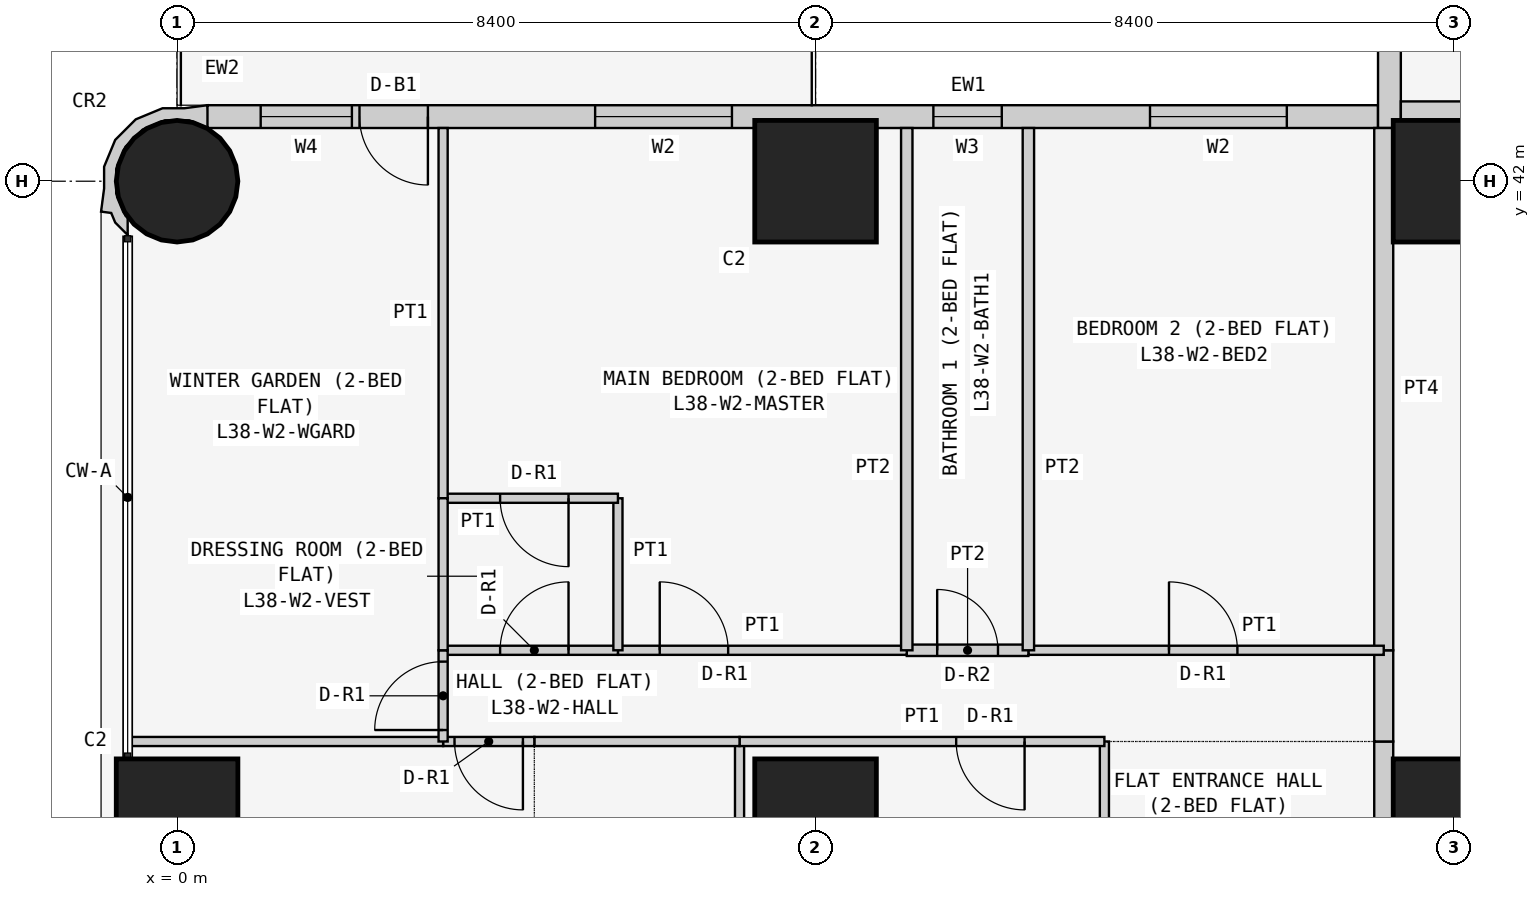
"""IFC4 building model, lengths in metres.
Left out: names, types, materials, properties, quantities, classifications, styles, units other than length and angle.
Written with IfcOpenShell. Run it as: python <this file> out.ifc"""

import sys

from ifc_helpers import new_model, si_unit, direction, frame, frame_2d, origin, origin_2d, place, context, subcontext, project, spatial, polyline, rectangle, circle, outline, extrude, element, fill, save


model = new_model("IFC4")
c1 = context("Model", 3, precision=1e-05, world=origin(), true_north=direction((0.0, 1.0)))
c2 = subcontext(c1, "Body", "Model", "MODEL_VIEW")
j1 = project(units=[si_unit("LENGTHUNIT", "METRE"), si_unit("PLANEANGLEUNIT", "RADIAN")], contexts=[c1])
p1 = place(None, origin())
s1 = spatial("IfcSite", under=j1, at=p1, CompositionType="ELEMENT")
p2 = place(p1, origin())
s2 = spatial("IfcBuilding", under=s1, at=p2, CompositionType="ELEMENT")
p3 = place(p2, frame((0.0, 0.0, 148.5)))
s3 = spatial("IfcBuildingStorey", under=s2, at=p3, CompositionType="ELEMENT", Elevation=148.5)
p4 = place(p3, frame((0.0, 33.6, 0.0), z_axis=(0.0, 0.0, 1.0), x_axis=(1.0, 0.0, 0.0)))
e1 = element("IfcColumn", 1, at=p4, inside=s3, PredefinedType="COLUMN", context=c2, shape_type="SweptSolid", body=[
    extrude(rectangle(XDim=1.6, YDim=1.6, at=origin_2d()), origin(), (0.0, 0.0, 1.0), 3.6),
])
p5 = place(p3, frame((0.0, 42.0, 0.0), z_axis=(0.0, 0.0, 1.0), x_axis=(1.0, 0.0, 0.0)))
e2 = element("IfcColumn", 2, at=p5, inside=s3, PredefinedType="COLUMN", context=c2, shape_type="SweptSolid", body=[
    extrude(circle(Radius=0.8, at=origin_2d()), origin(), (0.0, 0.0, 1.0), 3.6),
])
for number, where, z_axis, x_axis in (
    (3, (8.4, 33.6, 0.0), (0.0, 0.0, 1.0), (1.0, 0.0, 0.0)),
    (4, (8.4, 42.0, 0.0), (0.0, 0.0, 1.0), (1.0, 0.0, 0.0)),
    (5, (16.8, 33.6, 0.0), (0.0, 0.0, 1.0), (1.0, 0.0, 0.0)),
    (6, (16.8, 42.0, 0.0), (0.0, 0.0, 1.0), (1.0, 0.0, 0.0)),
):
    element("IfcColumn", number, at=place(p3, frame(where, z_axis=z_axis, x_axis=x_axis)), inside=s3, PredefinedType="COLUMN", context=c2, shape_type="SweptSolid", body=[
        extrude(rectangle(XDim=1.6, YDim=1.6, at=origin_2d()), origin(), (0.0, 0.0, 1.0), 3.6),
    ])
p6 = place(p3, frame((15.8, 42.85, 0.0), z_axis=(0.0, 0.0, 1.0), x_axis=(-1.0, 0.0, 0.0)))
e7 = element("IfcWall", 7, at=p6, inside=s3, PredefinedType="SOLIDWALL", context=c2, shape_type="SweptSolid", body=[
    extrude(rectangle(XDim=15.4, YDim=0.3, at=frame_2d((7.7, 0.0))), origin(), (0.0, 0.0, 1.0), 3.45),
])
p7 = place(p6, frame((1.2, 0.0, 0.9)))
e8 = element("IfcOpeningElement", 8, at=p7, cuts=e7, PredefinedType="OPENING", context=c2, shape_type="SweptSolid", body=[
    extrude(rectangle(XDim=1.8, YDim=1.5, at=frame_2d((0.9, 0.75))), frame((0.0, 0.16, 0.0), z_axis=(0.0, -1.0, 0.0), x_axis=(1.0, 0.0, 0.0)), (0.0, 0.0, 1.0), 0.32),
])
p8 = place(p6, frame((4.95, 0.0, 1.5)))
e9 = element("IfcOpeningElement", 9, at=p8, cuts=e7, PredefinedType="OPENING", context=c2, shape_type="SweptSolid", body=[
    extrude(rectangle(XDim=0.9, YDim=0.7, at=frame_2d((0.45, 0.35))), frame((0.0, 0.16, 0.0), z_axis=(0.0, -1.0, 0.0), x_axis=(1.0, 0.0, 0.0)), (0.0, 0.0, 1.0), 0.32),
])
p9 = place(p6, frame((8.5, 0.0, 0.9)))
e10 = element("IfcOpeningElement", 10, at=p9, cuts=e7, PredefinedType="OPENING", context=c2, shape_type="SweptSolid", body=[
    extrude(rectangle(XDim=1.8, YDim=1.5, at=frame_2d((0.9, 0.75))), frame((0.0, 0.16, 0.0), z_axis=(0.0, -1.0, 0.0), x_axis=(1.0, 0.0, 0.0)), (0.0, 0.0, 1.0), 0.32),
])
p10 = place(p6, frame((12.5, 0.0, 0.0)))
e11 = element("IfcOpeningElement", 11, at=p10, cuts=e7, PredefinedType="OPENING", context=c2, shape_type="SweptSolid", body=[
    extrude(rectangle(XDim=0.9, YDim=2.4, at=frame_2d((0.45, 1.2))), frame((0.0, 0.16, 0.0), z_axis=(0.0, -1.0, 0.0), x_axis=(1.0, 0.0, 0.0)), (0.0, 0.0, 1.0), 0.32),
])
p11 = place(p6, frame((13.5, 0.0, 0.9)))
e12 = element("IfcOpeningElement", 12, at=p11, cuts=e7, PredefinedType="OPENING", context=c2, shape_type="SweptSolid", body=[
    extrude(rectangle(XDim=1.2, YDim=1.5, at=frame_2d((0.6, 0.75))), frame((0.0, 0.16, 0.0), z_axis=(0.0, -1.0, 0.0), x_axis=(1.0, 0.0, 0.0)), (0.0, 0.0, 1.0), 0.32),
])
p12 = place(p3, frame((15.95, 50.0, 0.0), z_axis=(0.0, 0.0, 1.0), x_axis=(0.0, -1.0, 0.0)))
e13 = element("IfcWall", 13, at=p12, inside=s3, PredefinedType="SOLIDWALL", context=c2, shape_type="SweptSolid", body=[
    extrude(rectangle(XDim=7.3, YDim=0.3, at=frame_2d((3.65, 0.0))), origin(), (0.0, 0.0, 1.0), 3.45),
])
p13 = place(p12, frame((3.1, 0.0, 0.9)))
e14 = element("IfcOpeningElement", 14, at=p13, cuts=e13, PredefinedType="OPENING", context=c2, shape_type="SweptSolid", body=[
    extrude(rectangle(XDim=2.4, YDim=1.5, at=frame_2d((1.2, 0.75))), frame((0.0, 0.16, 0.0), z_axis=(0.0, -1.0, 0.0), x_axis=(1.0, 0.0, 0.0)), (0.0, 0.0, 1.0), 0.32),
])
p14 = place(p12, frame((0.75, 0.0, 0.9)))
e15 = element("IfcOpeningElement", 15, at=p14, cuts=e13, PredefinedType="OPENING", context=c2, shape_type="SweptSolid", body=[
    extrude(rectangle(XDim=1.2, YDim=1.5, at=frame_2d((0.6, 0.75))), frame((0.0, 0.16, 0.0), z_axis=(0.0, -1.0, 0.0), x_axis=(1.0, 0.0, 0.0)), (0.0, 0.0, 1.0), 0.32),
])
p15 = place(p3, frame((0.327, 42.817, 0.0), z_axis=(0.0, 0.0, 1.0), x_axis=(-0.93923434088, 0.343276641956, 0.0)))
e16 = element("IfcWall", 16, at=p15, inside=s3, PredefinedType="SOLIDWALL", context=c2, shape_type="SweptSolid", body=[
    extrude(outline(polyline([(-0.006, -0.197), (0.266, -0.055), (0.535, 0.044), (0.816, 0.302), (0.977, 0.648), (0.994, 1.03), (0.895, 1.299), (0.828, 1.598), (0.697, 1.569), (0.604, 1.67), (0.394, 1.767), (0.471, 1.556), (0.509, 1.539), (0.724, 1.304), (0.833, 1.005), (0.82, 0.687), (0.686, 0.397), (0.451, 0.182), (0.152, 0.073), (-0.116, 0.084), (-0.127, 0.078), (-0.146, 0.071), (-0.006, -0.197)])), origin(), (0.0, 0.0, 1.0), 3.45),
])
p16 = place(p3, frame((16.1, 42.925, 0.0), z_axis=(0.0, 0.0, 1.0), x_axis=(1.0, 0.0, 0.0)))
e17 = element("IfcWall", 17, at=p16, inside=s3, PredefinedType="PARTITIONING", context=c2, shape_type="SweptSolid", body=[
    extrude(rectangle(XDim=6.871, YDim=0.25, at=frame_2d((3.436, 0.0))), origin(), (0.0, 0.0, 1.0), 3.45),
])
p17 = place(p3, frame((15.875, 29.4, 0.0), z_axis=(0.0, 0.0, 1.0), x_axis=(0.0, 1.0, 0.0)))
e18 = element("IfcWall", 18, at=p17, inside=s3, PredefinedType="PARTITIONING", context=c2, shape_type="SweptSolid", body=[
    extrude(rectangle(XDim=5.229, YDim=0.25, at=frame_2d((2.615, 0.0))), origin(), (0.0, 0.0, 1.0), 3.45),
])
p18 = place(p17, frame((2.1, 0.0, 0.0)))
e19 = element("IfcOpeningElement", 19, at=p18, cuts=e18, PredefinedType="OPENING", context=c2, shape_type="SweptSolid", body=[
    extrude(rectangle(XDim=1.0, YDim=2.1, at=frame_2d((0.5, 1.05))), frame((0.0, 0.135, 0.0), z_axis=(0.0, -1.0, 0.0), x_axis=(1.0, 0.0, 0.0)), (0.0, 0.0, 1.0), 0.27),
])
p19 = place(p3, frame((15.875, 34.629, 0.0), z_axis=(0.0, 0.0, 1.0), x_axis=(0.0, 1.0, 0.0)))
e20 = element("IfcWall", 20, at=p19, inside=s3, PredefinedType="PARTITIONING", context=c2, shape_type="SweptSolid", body=[
    extrude(rectangle(XDim=1.2, YDim=0.25, at=frame_2d((0.6, 0.0))), origin(), (0.0, 0.0, 1.0), 3.45),
])
p20 = place(p3, frame((15.875, 35.829, 0.0), z_axis=(0.0, 0.0, 1.0), x_axis=(0.0, 1.0, 0.0)))
e21 = element("IfcWall", 21, at=p20, inside=s3, PredefinedType="PARTITIONING", context=c2, shape_type="SweptSolid", body=[
    extrude(rectangle(XDim=6.871, YDim=0.25, at=frame_2d((3.436, 0.0))), origin(), (0.0, 0.0, 1.0), 3.45),
])
for number, where, z_axis, x_axis in (
    (22, (12.2, 29.4, 0.0), (0.0, 0.0, 1.0), (0.0, 1.0, 0.0)),
    (23, (7.4, 29.4, 0.0), (0.0, 0.0, 1.0), (0.0, 1.0, 0.0)),
):
    element("IfcWall", number, at=place(p3, frame(where, z_axis=z_axis, x_axis=x_axis)), inside=s3, PredefinedType="PARTITIONING", context=c2, shape_type="SweptSolid", body=[
        extrude(rectangle(XDim=5.229, YDim=0.12, at=frame_2d((2.615, 0.0))), origin(), (0.0, 0.0, 1.0), 3.45),
    ])
p21 = place(p3, frame((7.4, 34.629, 0.0), z_axis=(0.0, 0.0, 1.0), x_axis=(1.0, 0.0, 0.0)))
e24 = element("IfcWall", 24, at=p21, inside=s3, PredefinedType="PARTITIONING", context=c2, shape_type="SweptSolid", body=[
    extrude(rectangle(XDim=4.8, YDim=0.12, at=frame_2d((2.4, 0.0))), origin(), (0.0, 0.0, 1.0), 3.45),
])
p22 = place(p21, frame((2.85, 0.0, 0.0)))
e25 = element("IfcOpeningElement", 25, at=p22, cuts=e24, PredefinedType="OPENING", context=c2, shape_type="SweptSolid", body=[
    extrude(rectangle(XDim=0.9, YDim=2.1, at=frame_2d((0.45, 1.05))), frame((0.0, 0.07, 0.0), z_axis=(0.0, -1.0, 0.0), x_axis=(1.0, 0.0, 0.0)), (0.0, 0.0, 1.0), 0.14),
])
p23 = place(p3, frame((4.7, 34.629, 0.0), z_axis=(0.0, 0.0, 1.0), x_axis=(1.0, 0.0, 0.0)))
e26 = element("IfcWall", 26, at=p23, inside=s3, PredefinedType="PARTITIONING", context=c2, shape_type="SweptSolid", body=[
    extrude(rectangle(XDim=2.7, YDim=0.12, at=frame_2d((1.35, 0.0))), origin(), (0.0, 0.0, 1.0), 3.45),
])
p24 = place(p3, frame((3.5, 34.629, 0.0), z_axis=(0.0, 0.0, 1.0), x_axis=(1.0, 0.0, 0.0)))
e27 = element("IfcWall", 27, at=p24, inside=s3, PredefinedType="PARTITIONING", context=c2, shape_type="SweptSolid", body=[
    extrude(rectangle(XDim=1.2, YDim=0.12, at=frame_2d((0.6, 0.0))), origin(), (0.0, 0.0, 1.0), 3.45),
])
p25 = place(p24, frame((0.15, 0.0, 0.0)))
e28 = element("IfcOpeningElement", 28, at=p25, cuts=e27, PredefinedType="OPENING", context=c2, shape_type="SweptSolid", body=[
    extrude(rectangle(XDim=0.9, YDim=2.1, at=frame_2d((0.45, 1.05))), frame((0.0, 0.07, 0.0), z_axis=(0.0, -1.0, 0.0), x_axis=(1.0, 0.0, 0.0)), (0.0, 0.0, 1.0), 0.14),
])
p26 = place(p3, frame((-0.65, 34.629, 0.0), z_axis=(0.0, 0.0, 1.0), x_axis=(1.0, 0.0, 0.0)))
e29 = element("IfcWall", 29, at=p26, inside=s3, PredefinedType="PARTITIONING", context=c2, shape_type="SweptSolid", body=[
    extrude(rectangle(XDim=4.15, YDim=0.12, at=frame_2d((2.075, 0.0))), origin(), (0.0, 0.0, 1.0), 3.45),
])
p27 = place(p3, frame((11.2, 35.829, 0.0), z_axis=(0.0, 0.0, 1.0), x_axis=(1.0, 0.0, 0.0)))
e30 = element("IfcWall", 30, at=p27, inside=s3, PredefinedType="PARTITIONING", context=c2, shape_type="SweptSolid", body=[
    extrude(rectangle(XDim=4.675, YDim=0.12, at=frame_2d((2.337, 0.0))), origin(), (0.0, 0.0, 1.0), 3.45),
])
p28 = place(p27, frame((1.85, 0.0, 0.0)))
e31 = element("IfcOpeningElement", 31, at=p28, cuts=e30, PredefinedType="OPENING", context=c2, shape_type="SweptSolid", body=[
    extrude(rectangle(XDim=0.9, YDim=2.1, at=frame_2d((0.45, 1.05))), frame((0.0, 0.07, 0.0), z_axis=(0.0, -1.0, 0.0), x_axis=(1.0, 0.0, 0.0)), (0.0, 0.0, 1.0), 0.14),
])
p29 = place(p3, frame((9.6, 35.829, 0.0), z_axis=(0.0, 0.0, 1.0), x_axis=(1.0, 0.0, 0.0)))
e32 = element("IfcWall", 32, at=p29, inside=s3, PredefinedType="PARTITIONING", context=c2, shape_type="SweptSolid", body=[
    extrude(rectangle(XDim=1.6, YDim=0.15, at=frame_2d((0.8, 0.0))), origin(), (0.0, 0.0, 1.0), 3.45),
])
p30 = place(p29, frame((0.4, 0.0, 0.0)))
e33 = element("IfcOpeningElement", 33, at=p30, cuts=e32, PredefinedType="OPENING", context=c2, shape_type="SweptSolid", body=[
    extrude(rectangle(XDim=0.8, YDim=2.1, at=frame_2d((0.4, 1.05))), frame((0.0, 0.085, 0.0), z_axis=(0.0, -1.0, 0.0), x_axis=(1.0, 0.0, 0.0)), (0.0, 0.0, 1.0), 0.17),
])
p31 = place(p3, frame((5.8, 35.829, 0.0), z_axis=(0.0, 0.0, 1.0), x_axis=(1.0, 0.0, 0.0)))
e34 = element("IfcWall", 34, at=p31, inside=s3, PredefinedType="PARTITIONING", context=c2, shape_type="SweptSolid", body=[
    extrude(rectangle(XDim=3.8, YDim=0.12, at=frame_2d((1.9, 0.0))), origin(), (0.0, 0.0, 1.0), 3.45),
])
p32 = place(p31, frame((0.55, 0.0, 0.0)))
e35 = element("IfcOpeningElement", 35, at=p32, cuts=e34, PredefinedType="OPENING", context=c2, shape_type="SweptSolid", body=[
    extrude(rectangle(XDim=0.9, YDim=2.1, at=frame_2d((0.45, 1.05))), frame((0.0, 0.07, 0.0), z_axis=(0.0, -1.0, 0.0), x_axis=(1.0, 0.0, 0.0)), (0.0, 0.0, 1.0), 0.14),
])
p33 = place(p3, frame((3.5, 35.829, 0.0), z_axis=(0.0, 0.0, 1.0), x_axis=(1.0, 0.0, 0.0)))
e36 = element("IfcWall", 36, at=p33, inside=s3, PredefinedType="PARTITIONING", context=c2, shape_type="SweptSolid", body=[
    extrude(rectangle(XDim=2.3, YDim=0.12, at=frame_2d((1.15, 0.0))), origin(), (0.0, 0.0, 1.0), 3.45),
])
p34 = place(p33, frame((0.75, 0.0, 0.0)))
e37 = element("IfcOpeningElement", 37, at=p34, cuts=e36, PredefinedType="OPENING", context=c2, shape_type="SweptSolid", body=[
    extrude(rectangle(XDim=0.9, YDim=2.1, at=frame_2d((0.45, 1.05))), frame((0.0, 0.07, 0.0), z_axis=(0.0, -1.0, 0.0), x_axis=(1.0, 0.0, 0.0)), (0.0, 0.0, 1.0), 0.14),
])
p35 = place(p3, frame((3.5, 34.629, 0.0), z_axis=(0.0, 0.0, 1.0), x_axis=(0.0, 1.0, 0.0)))
e38 = element("IfcWall", 38, at=p35, inside=s3, PredefinedType="PARTITIONING", context=c2, shape_type="SweptSolid", body=[
    extrude(rectangle(XDim=1.2, YDim=0.12, at=frame_2d((0.6, 0.0))), origin(), (0.0, 0.0, 1.0), 3.45),
])
p36 = place(p35, frame((0.151, 0.0, 0.0)))
e39 = element("IfcOpeningElement", 39, at=p36, cuts=e38, PredefinedType="OPENING", context=c2, shape_type="SweptSolid", body=[
    extrude(rectangle(XDim=0.9, YDim=2.1, at=frame_2d((0.45, 1.05))), frame((0.0, 0.07, 0.0), z_axis=(0.0, -1.0, 0.0), x_axis=(1.0, 0.0, 0.0)), (0.0, 0.0, 1.0), 0.14),
])
for number, where, z_axis, x_axis in (
    (40, (11.2, 35.829, 0.0), (0.0, 0.0, 1.0), (0.0, 1.0, 0.0)),
    (41, (9.6, 35.829, 0.0), (0.0, 0.0, 1.0), (0.0, 1.0, 0.0)),
):
    element("IfcWall", number, at=place(p3, frame(where, z_axis=z_axis, x_axis=x_axis)), inside=s3, PredefinedType="PARTITIONING", context=c2, shape_type="SweptSolid", body=[
        extrude(rectangle(XDim=6.871, YDim=0.15, at=frame_2d((3.436, 0.0))), origin(), (0.0, 0.0, 1.0), 3.45),
    ])
p37 = place(p3, frame((5.8, 35.829, 0.0), z_axis=(0.0, 0.0, 1.0), x_axis=(0.0, 1.0, 0.0)))
e42 = element("IfcWall", 42, at=p37, inside=s3, PredefinedType="PARTITIONING", context=c2, shape_type="SweptSolid", body=[
    extrude(rectangle(XDim=2.0, YDim=0.12, at=frame_2d((1.0, 0.0))), origin(), (0.0, 0.0, 1.0), 3.45),
])
p38 = place(p3, frame((5.8, 37.829, 0.0), z_axis=(0.0, 0.0, 1.0), x_axis=(-1.0, 0.0, 0.0)))
e43 = element("IfcWall", 43, at=p38, inside=s3, PredefinedType="PARTITIONING", context=c2, shape_type="SweptSolid", body=[
    extrude(rectangle(XDim=2.3, YDim=0.12, at=frame_2d((1.15, 0.0))), origin(), (0.0, 0.0, 1.0), 3.45),
])
p39 = place(p38, frame((0.65, 0.0, 0.0)))
e44 = element("IfcOpeningElement", 44, at=p39, cuts=e43, PredefinedType="OPENING", context=c2, shape_type="SweptSolid", body=[
    extrude(rectangle(XDim=0.9, YDim=2.1, at=frame_2d((0.45, 1.05))), frame((0.0, 0.07, 0.0), z_axis=(0.0, -1.0, 0.0), x_axis=(1.0, 0.0, 0.0)), (0.0, 0.0, 1.0), 0.14),
])
p40 = place(p3, frame((3.5, 37.829, 0.0), z_axis=(0.0, 0.0, 1.0), x_axis=(0.0, 1.0, 0.0)))
e45 = element("IfcWall", 45, at=p40, inside=s3, PredefinedType="PARTITIONING", context=c2, shape_type="SweptSolid", body=[
    extrude(rectangle(XDim=4.871, YDim=0.12, at=frame_2d((2.436, 0.0))), origin(), (0.0, 0.0, 1.0), 3.45),
])
p41 = place(p3, frame((3.5, 35.829, 0.0), z_axis=(0.0, 0.0, 1.0), x_axis=(0.0, 1.0, 0.0)))
e46 = element("IfcWall", 46, at=p41, inside=s3, PredefinedType="PARTITIONING", context=c2, shape_type="SweptSolid", body=[
    extrude(rectangle(XDim=2.0, YDim=0.12, at=frame_2d((1.0, 0.0))), origin(), (0.0, 0.0, 1.0), 3.45),
])
p42 = place(p7, origin())
e47 = element("IfcWindow", 47, at=p42, inside=s3, PartitioningType="SINGLE_PANEL", PredefinedType="WINDOW", context=c2, shape_type="SweptSolid", body=[
    extrude(rectangle(XDim=1.8, YDim=1.5, at=frame_2d((0.9, 0.75))), frame((0.0, 0.03, 0.0), z_axis=(0.0, -1.0, 0.0), x_axis=(1.0, 0.0, 0.0)), (0.0, 0.0, 1.0), 0.06),
])
fill(e8, e47)
p43 = place(p8, origin())
e48 = element("IfcWindow", 48, at=p43, inside=s3, PartitioningType="SINGLE_PANEL", PredefinedType="WINDOW", context=c2, shape_type="SweptSolid", body=[
    extrude(rectangle(XDim=0.9, YDim=0.7, at=frame_2d((0.45, 0.35))), frame((0.0, 0.03, 0.0), z_axis=(0.0, -1.0, 0.0), x_axis=(1.0, 0.0, 0.0)), (0.0, 0.0, 1.0), 0.06),
])
fill(e9, e48)
p44 = place(p9, origin())
e49 = element("IfcWindow", 49, at=p44, inside=s3, PartitioningType="SINGLE_PANEL", PredefinedType="WINDOW", context=c2, shape_type="SweptSolid", body=[
    extrude(rectangle(XDim=1.8, YDim=1.5, at=frame_2d((0.9, 0.75))), frame((0.0, 0.03, 0.0), z_axis=(0.0, -1.0, 0.0), x_axis=(1.0, 0.0, 0.0)), (0.0, 0.0, 1.0), 0.06),
])
fill(e10, e49)
p45 = place(p10, origin())
e50 = element("IfcDoor", 50, at=p45, inside=s3, OperationType="SINGLE_SWING_LEFT", PredefinedType="DOOR", context=c2, shape_type="SweptSolid", body=[
    extrude(rectangle(XDim=0.9, YDim=2.4, at=frame_2d((0.45, 1.2))), frame((0.0, 0.025, 0.0), z_axis=(0.0, -1.0, 0.0), x_axis=(1.0, 0.0, 0.0)), (0.0, 0.0, 1.0), 0.05),
])
fill(e11, e50)
p46 = place(p11, origin())
e51 = element("IfcWindow", 51, at=p46, inside=s3, PartitioningType="SINGLE_PANEL", PredefinedType="WINDOW", context=c2, shape_type="SweptSolid", body=[
    extrude(rectangle(XDim=1.2, YDim=1.5, at=frame_2d((0.6, 0.75))), frame((0.0, 0.03, 0.0), z_axis=(0.0, -1.0, 0.0), x_axis=(1.0, 0.0, 0.0)), (0.0, 0.0, 1.0), 0.06),
])
fill(e12, e51)
p47 = place(p22, frame((0.9, 0.0, 0.0), z_axis=(0.0, 0.0, 1.0), x_axis=(-1.0, 0.0, 0.0)))
e52 = element("IfcDoor", 52, at=p47, inside=s3, OperationType="SINGLE_SWING_LEFT", PredefinedType="DOOR", context=c2, shape_type="SweptSolid", body=[
    extrude(rectangle(XDim=0.9, YDim=2.1, at=frame_2d((0.45, 1.05))), frame((0.0, 0.025, 0.0), z_axis=(0.0, -1.0, 0.0), x_axis=(1.0, 0.0, 0.0)), (0.0, 0.0, 1.0), 0.05),
])
fill(e25, e52)
p48 = place(p25, frame((0.9, 0.0, 0.0), z_axis=(0.0, 0.0, 1.0), x_axis=(-1.0, 0.0, 0.0)))
e53 = element("IfcDoor", 53, at=p48, inside=s3, OperationType="SINGLE_SWING_LEFT", PredefinedType="DOOR", context=c2, shape_type="SweptSolid", body=[
    extrude(rectangle(XDim=0.9, YDim=2.1, at=frame_2d((0.45, 1.05))), frame((0.0, 0.025, 0.0), z_axis=(0.0, -1.0, 0.0), x_axis=(1.0, 0.0, 0.0)), (0.0, 0.0, 1.0), 0.05),
])
fill(e28, e53)
p49 = place(p28, origin())
e54 = element("IfcDoor", 54, at=p49, inside=s3, OperationType="SINGLE_SWING_LEFT", PredefinedType="DOOR", context=c2, shape_type="SweptSolid", body=[
    extrude(rectangle(XDim=0.9, YDim=2.1, at=frame_2d((0.45, 1.05))), frame((0.0, 0.025, 0.0), z_axis=(0.0, -1.0, 0.0), x_axis=(1.0, 0.0, 0.0)), (0.0, 0.0, 1.0), 0.05),
])
fill(e31, e54)
p50 = place(p30, origin())
e55 = element("IfcDoor", 55, at=p50, inside=s3, OperationType="SINGLE_SWING_LEFT", PredefinedType="DOOR", context=c2, shape_type="SweptSolid", body=[
    extrude(rectangle(XDim=0.8, YDim=2.1, at=frame_2d((0.4, 1.05))), frame((0.0, 0.025, 0.0), z_axis=(0.0, -1.0, 0.0), x_axis=(1.0, 0.0, 0.0)), (0.0, 0.0, 1.0), 0.05),
])
fill(e33, e55)
p51 = place(p32, origin())
e56 = element("IfcDoor", 56, at=p51, inside=s3, OperationType="SINGLE_SWING_LEFT", PredefinedType="DOOR", context=c2, shape_type="SweptSolid", body=[
    extrude(rectangle(XDim=0.9, YDim=2.1, at=frame_2d((0.45, 1.05))), frame((0.0, 0.025, 0.0), z_axis=(0.0, -1.0, 0.0), x_axis=(1.0, 0.0, 0.0)), (0.0, 0.0, 1.0), 0.05),
])
fill(e35, e56)
p52 = place(p34, origin())
e57 = element("IfcDoor", 57, at=p52, inside=s3, OperationType="SINGLE_SWING_RIGHT", PredefinedType="DOOR", context=c2, shape_type="SweptSolid", body=[
    extrude(rectangle(XDim=0.9, YDim=2.1, at=frame_2d((0.45, 1.05))), frame((0.0, 0.025, 0.0), z_axis=(0.0, -1.0, 0.0), x_axis=(1.0, 0.0, 0.0)), (0.0, 0.0, 1.0), 0.05),
])
fill(e37, e57)
p53 = place(p39, origin())
e58 = element("IfcDoor", 58, at=p53, inside=s3, OperationType="SINGLE_SWING_LEFT", PredefinedType="DOOR", context=c2, shape_type="SweptSolid", body=[
    extrude(rectangle(XDim=0.9, YDim=2.1, at=frame_2d((0.45, 1.05))), frame((0.0, 0.025, 0.0), z_axis=(0.0, -1.0, 0.0), x_axis=(1.0, 0.0, 0.0)), (0.0, 0.0, 1.0), 0.05),
])
fill(e44, e58)
p54 = place(p36, origin())
e59 = element("IfcDoor", 59, at=p54, inside=s3, OperationType="SINGLE_SWING_LEFT", PredefinedType="DOOR", context=c2, shape_type="SweptSolid", body=[
    extrude(rectangle(XDim=0.9, YDim=2.1, at=frame_2d((0.45, 1.05))), frame((0.0, 0.025, 0.0), z_axis=(0.0, -1.0, 0.0), x_axis=(1.0, 0.0, 0.0)), (0.0, 0.0, 1.0), 0.05),
])
fill(e39, e59)
save(model, sys.argv[1])
